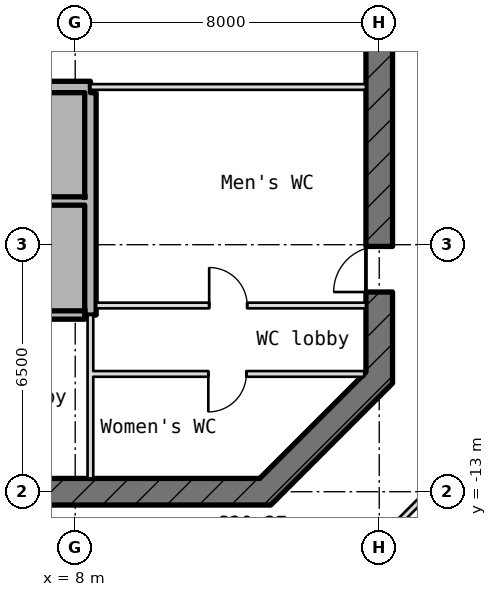
"""IFC4 building model, lengths in metres.
Left out: names, types, materials, properties, quantities, classifications, styles, units other than length and angle.
Written with IfcOpenShell. Run it as: python <this file> out.ifc"""

import sys

from ifc_helpers import new_model, si_unit, direction, frame, frame_2d, origin, place, context, subcontext, project, spatial, rectangle, extrude, element, fill, save


model = new_model("IFC4")
c1 = context("Model", 3, precision=1e-05, world=origin(), true_north=direction((0.0, 1.0)))
c2 = subcontext(c1, "Body", "Model", "MODEL_VIEW")
j1 = project(units=[si_unit("LENGTHUNIT", "METRE"), si_unit("PLANEANGLEUNIT", "RADIAN")], contexts=[c1])
p1 = place(None, origin())
s1 = spatial("IfcSite", under=j1, at=p1, CompositionType="ELEMENT")
p2 = place(p1, origin())
s2 = spatial("IfcBuilding", under=s1, at=p2, CompositionType="ELEMENT")
p3 = place(p2, frame((0.0, 0.0, 296.95)))
s3 = spatial("IfcBuildingStorey", under=s2, at=p3, CompositionType="ELEMENT", Elevation=296.95)
p4 = place(p3, frame((12.897, -13.103, -0.18), z_axis=(0.0, 0.0, 1.0), x_axis=(0.707106781187, 0.707106781187, 0.0)))
e1 = element("IfcWall", 1, at=p4, inside=s3, PredefinedType="SHEAR", context=c2, shape_type="SweptSolid", body=[
    extrude(rectangle(XDim=4.533, YDim=0.7, at=frame_2d((2.266, 0.0))), origin(), (0.0, 0.0, 1.0), 4.15),
])
p5 = place(p3, frame((16.0, -10.145, -0.18), z_axis=(0.0, 0.0, 1.0), x_axis=(0.0, 1.0, 0.0)))
e2 = element("IfcWall", 2, at=p5, inside=s3, PredefinedType="SHEAR", context=c2, shape_type="SweptSolid", body=[
    extrude(rectangle(XDim=20.29, YDim=0.7, at=frame_2d((10.145, 0.0))), origin(), (0.0, 0.0, 1.0), 4.15),
])
p6 = place(p5, frame((8.945, 0.0, 0.18)))
e3 = element("IfcOpeningElement", 3, at=p6, cuts=e2, PredefinedType="OPENING", context=c2, shape_type="SweptSolid", body=[
    extrude(rectangle(XDim=2.4, YDim=2.1, at=frame_2d((1.2, 1.05))), frame((0.0, 0.36, 0.0), z_axis=(0.0, -1.0, 0.0), x_axis=(1.0, 0.0, 0.0)), (0.0, 0.0, 1.0), 0.72),
])
p7 = place(p5, frame((13.545, 0.0, 0.18)))
e4 = element("IfcOpeningElement", 4, at=p7, cuts=e2, PredefinedType="OPENING", context=c2, shape_type="SweptSolid", body=[
    extrude(rectangle(XDim=1.2, YDim=2.1, at=frame_2d((0.6, 1.05))), frame((0.0, 0.36, 0.0), z_axis=(0.0, -1.0, 0.0), x_axis=(1.0, 0.0, 0.0)), (0.0, 0.0, 1.0), 0.72),
])
p8 = place(p5, frame((2.4, 0.0, 0.18)))
e5 = element("IfcOpeningElement", 5, at=p8, cuts=e2, PredefinedType="OPENING", context=c2, shape_type="SweptSolid", body=[
    extrude(rectangle(XDim=1.2, YDim=2.1, at=frame_2d((0.6, 1.05))), frame((0.0, 0.36, 0.0), z_axis=(0.0, -1.0, 0.0), x_axis=(1.0, 0.0, 0.0)), (0.0, 0.0, 1.0), 0.72),
])
p9 = place(p3, frame((-13.145, -13.0, -0.18), z_axis=(0.0, 0.0, 1.0), x_axis=(1.0, 0.0, 0.0)))
e6 = element("IfcWall", 6, at=p9, inside=s3, PredefinedType="SHEAR", context=c2, shape_type="SweptSolid", body=[
    extrude(rectangle(XDim=26.29, YDim=0.7, at=frame_2d((13.145, 0.0))), origin(), (0.0, 0.0, 1.0), 4.15),
])
p10 = place(p9, frame((2.845, 0.0, 0.18)))
e7 = element("IfcOpeningElement", 7, at=p10, cuts=e6, PredefinedType="OPENING", context=c2, shape_type="SweptSolid", body=[
    extrude(rectangle(XDim=1.2, YDim=2.1, at=frame_2d((0.6, 1.05))), frame((0.0, 0.36, 0.0), z_axis=(0.0, -1.0, 0.0), x_axis=(1.0, 0.0, 0.0)), (0.0, 0.0, 1.0), 0.72),
])
p11 = place(p9, frame((6.845, 0.0, 0.18)))
e8 = element("IfcOpeningElement", 8, at=p11, cuts=e6, PredefinedType="OPENING", context=c2, shape_type="SweptSolid", body=[
    extrude(rectangle(XDim=1.4, YDim=2.1, at=frame_2d((0.7, 1.05))), frame((0.0, 0.36, 0.0), z_axis=(0.0, -1.0, 0.0), x_axis=(1.0, 0.0, 0.0)), (0.0, 0.0, 1.0), 0.72),
])
p12 = place(p9, frame((15.445, 0.0, 0.18)))
e9 = element("IfcOpeningElement", 9, at=p12, cuts=e6, PredefinedType="OPENING", context=c2, shape_type="SweptSolid", body=[
    extrude(rectangle(XDim=1.4, YDim=2.1, at=frame_2d((0.7, 1.05))), frame((0.0, 0.36, 0.0), z_axis=(0.0, -1.0, 0.0), x_axis=(1.0, 0.0, 0.0)), (0.0, 0.0, 1.0), 0.72),
])
p13 = place(p3, frame((8.475, -9.9, 0.0), z_axis=(0.0, 0.0, 1.0), x_axis=(1.0, 0.0, 0.0)))
e10 = element("IfcWall", 10, at=p13, inside=s3, PredefinedType="PARTITIONING", context=c2, shape_type="SweptSolid", body=[
    extrude(rectangle(XDim=7.13, YDim=0.15, at=frame_2d((3.565, 0.0))), origin(), (0.0, 0.0, 1.0), 3.97),
])
p14 = place(p13, frame((3.028, 0.0, 0.0)))
e11 = element("IfcOpeningElement", 11, at=p14, cuts=e10, PredefinedType="OPENING", context=c2, shape_type="SweptSolid", body=[
    extrude(rectangle(XDim=1.0, YDim=2.1, at=frame_2d((0.5, 1.05))), frame((0.0, 0.085, 0.0), z_axis=(0.0, -1.0, 0.0), x_axis=(1.0, 0.0, 0.0)), (0.0, 0.0, 1.0), 0.17),
])
p15 = place(p3, frame((-2.69, -8.35, 0.0), z_axis=(0.0, 0.0, 1.0), x_axis=(1.0, 0.0, 0.0)))
e12 = element("IfcWall", 12, at=p15, inside=s3, PredefinedType="STANDARD", context=c2, shape_type="SweptSolid", body=[
    extrude(rectangle(XDim=10.94, YDim=0.22, at=frame_2d((5.47, 0.0))), origin(), (0.0, 0.0, 1.0), 3.97),
])
p16 = place(p15, frame((0.74, 0.0, 0.0)))
e13 = element("IfcOpeningElement", 13, at=p16, cuts=e12, PredefinedType="OPENING", context=c2, shape_type="SweptSolid", body=[
    extrude(rectangle(XDim=1.1, YDim=2.1, at=frame_2d((0.55, 1.05))), frame((0.0, 0.12, 0.0), z_axis=(0.0, -1.0, 0.0), x_axis=(1.0, 0.0, 0.0)), (0.0, 0.0, 1.0), 0.24),
])
p17 = place(p15, frame((3.54, 0.0, 0.0)))
e14 = element("IfcOpeningElement", 14, at=p17, cuts=e12, PredefinedType="OPENING", context=c2, shape_type="SweptSolid", body=[
    extrude(rectangle(XDim=1.1, YDim=2.1, at=frame_2d((0.55, 1.05))), frame((0.0, 0.12, 0.0), z_axis=(0.0, -1.0, 0.0), x_axis=(1.0, 0.0, 0.0)), (0.0, 0.0, 1.0), 0.24),
])
p18 = place(p3, frame((8.55, -8.1, 0.0), z_axis=(0.0, 0.0, 1.0), x_axis=(1.0, 0.0, 0.0)))
e15 = element("IfcWall", 15, at=p18, inside=s3, PredefinedType="PARTITIONING", context=c2, shape_type="SweptSolid", body=[
    extrude(rectangle(XDim=7.1, YDim=0.15, at=frame_2d((3.55, 0.0))), origin(), (0.0, 0.0, 1.0), 3.97),
])
p19 = place(p18, frame((2.975, 0.0, 0.0)))
e16 = element("IfcOpeningElement", 16, at=p19, cuts=e15, PredefinedType="OPENING", context=c2, shape_type="SweptSolid", body=[
    extrude(rectangle(XDim=1.0, YDim=2.1, at=frame_2d((0.5, 1.05))), frame((0.0, 0.085, 0.0), z_axis=(0.0, -1.0, 0.0), x_axis=(1.0, 0.0, 0.0)), (0.0, 0.0, 1.0), 0.17),
])
p20 = place(p3, frame((-8.25, -5.35, 0.0), z_axis=(0.0, 0.0, 1.0), x_axis=(1.0, 0.0, 0.0)))
e17 = element("IfcWall", 17, at=p20, inside=s3, PredefinedType="STANDARD", context=c2, shape_type="SweptSolid", body=[
    extrude(rectangle(XDim=16.5, YDim=0.22, at=frame_2d((8.25, 0.0))), origin(), (0.0, 0.0, 1.0), 3.97),
])
p21 = place(p3, frame((-8.4, -2.35, -0.18), z_axis=(0.0, 0.0, 1.0), x_axis=(1.0, 0.0, 0.0)))
e18 = element("IfcWall", 18, at=p21, inside=s3, PredefinedType="SHEAR", context=c2, shape_type="SweptSolid", body=[
    extrude(rectangle(XDim=16.8, YDim=0.3, at=frame_2d((8.4, 0.0))), origin(), (0.0, 0.0, 1.0), 4.15),
])
p22 = place(p21, frame((2.2, 0.0, 0.18)))
e19 = element("IfcOpeningElement", 19, at=p22, cuts=e18, PredefinedType="OPENING", context=c2, shape_type="SweptSolid", body=[
    extrude(rectangle(XDim=1.2, YDim=2.1, at=frame_2d((0.6, 1.05))), frame((0.0, 0.16, 0.0), z_axis=(0.0, -1.0, 0.0), x_axis=(1.0, 0.0, 0.0)), (0.0, 0.0, 1.0), 0.32),
])
p23 = place(p21, frame((5.0, 0.0, 0.18)))
e20 = element("IfcOpeningElement", 20, at=p23, cuts=e18, PredefinedType="OPENING", context=c2, shape_type="SweptSolid", body=[
    extrude(rectangle(XDim=1.2, YDim=2.1, at=frame_2d((0.6, 1.05))), frame((0.0, 0.16, 0.0), z_axis=(0.0, -1.0, 0.0), x_axis=(1.0, 0.0, 0.0)), (0.0, 0.0, 1.0), 0.32),
])
p24 = place(p21, frame((7.8, 0.0, 0.18)))
e21 = element("IfcOpeningElement", 21, at=p24, cuts=e18, PredefinedType="OPENING", context=c2, shape_type="SweptSolid", body=[
    extrude(rectangle(XDim=1.2, YDim=2.1, at=frame_2d((0.6, 1.05))), frame((0.0, 0.16, 0.0), z_axis=(0.0, -1.0, 0.0), x_axis=(1.0, 0.0, 0.0)), (0.0, 0.0, 1.0), 0.32),
])
p25 = place(p21, frame((10.6, 0.0, 0.18)))
e22 = element("IfcOpeningElement", 22, at=p25, cuts=e18, PredefinedType="OPENING", context=c2, shape_type="SweptSolid", body=[
    extrude(rectangle(XDim=1.2, YDim=2.1, at=frame_2d((0.6, 1.05))), frame((0.0, 0.16, 0.0), z_axis=(0.0, -1.0, 0.0), x_axis=(1.0, 0.0, 0.0)), (0.0, 0.0, 1.0), 0.32),
])
p26 = place(p21, frame((13.4, 0.0, 0.18)))
e23 = element("IfcOpeningElement", 23, at=p26, cuts=e18, PredefinedType="OPENING", context=c2, shape_type="SweptSolid", body=[
    extrude(rectangle(XDim=1.2, YDim=2.1, at=frame_2d((0.6, 1.05))), frame((0.0, 0.16, 0.0), z_axis=(0.0, -1.0, 0.0), x_axis=(1.0, 0.0, 0.0)), (0.0, 0.0, 1.0), 0.32),
])
p27 = place(p3, frame((8.4, -2.35, 0.0), z_axis=(0.0, 0.0, 1.0), x_axis=(1.0, 0.0, 0.0)))
e24 = element("IfcWall", 24, at=p27, inside=s3, PredefinedType="PARTITIONING", context=c2, shape_type="SweptSolid", body=[
    extrude(rectangle(XDim=7.25, YDim=0.15, at=frame_2d((3.625, 0.0))), origin(), (0.0, 0.0, 1.0), 3.97),
])
p28 = place(p3, frame((8.4, -12.65, 0.0), z_axis=(0.0, 0.0, 1.0), x_axis=(0.0, 1.0, 0.0)))
e25 = element("IfcWall", 25, at=p28, inside=s3, PredefinedType="PARTITIONING", context=c2, shape_type="SweptSolid", body=[
    extrude(rectangle(XDim=4.3, YDim=0.15, at=frame_2d((2.15, 0.0))), origin(), (0.0, 0.0, 1.0), 3.97),
])
p29 = place(p3, frame((8.4, -8.35, -0.18), z_axis=(0.0, 0.0, 1.0), x_axis=(0.0, 1.0, 0.0)))
e26 = element("IfcWall", 26, at=p29, inside=s3, PredefinedType="SHEAR", context=c2, shape_type="SweptSolid", body=[
    extrude(rectangle(XDim=5.85, YDim=0.3, at=frame_2d((2.925, 0.0))), origin(), (0.0, 0.0, 1.0), 4.15),
])
p30 = place(p3, frame((19.05, -11.263, 0.0), z_axis=(0.0, 0.0, 1.0), x_axis=(-0.707106781187, -0.707106781187, 0.0)))
e27 = element("IfcWall", 27, at=p30, inside=s3, PredefinedType="PARTITIONING", context=c2, shape_type="SweptSolid", body=[
    extrude(rectangle(XDim=6.769, YDim=0.15, at=frame_2d((3.385, 0.0))), origin(), (0.0, 0.0, 1.0), 3.97),
])
p31 = place(p19, origin())
e28 = element("IfcDoor", 28, at=p31, inside=s3, OperationType="SINGLE_SWING_RIGHT", PredefinedType="DOOR", context=c2, shape_type="SweptSolid", body=[
    extrude(rectangle(XDim=1.0, YDim=2.1, at=frame_2d((0.5, 1.05))), frame((0.0, 0.025, 0.0), z_axis=(0.0, -1.0, 0.0), x_axis=(1.0, 0.0, 0.0)), (0.0, 0.0, 1.0), 0.05),
])
fill(e16, e28)
p32 = place(p8, origin())
e29 = element("IfcDoor", 29, at=p32, inside=s3, OperationType="SINGLE_SWING_RIGHT", PredefinedType="DOOR", context=c2, shape_type="SweptSolid", body=[
    extrude(rectangle(XDim=1.2, YDim=2.1, at=frame_2d((0.6, 1.05))), frame((0.0, 0.025, 0.0), z_axis=(0.0, -1.0, 0.0), x_axis=(1.0, 0.0, 0.0)), (0.0, 0.0, 1.0), 0.05),
])
fill(e5, e29)
p33 = place(p14, frame((1.0, 0.0, 0.0), z_axis=(0.0, 0.0, 1.0), x_axis=(-1.0, 0.0, 0.0)))
e30 = element("IfcDoor", 30, at=p33, inside=s3, OperationType="SINGLE_SWING_LEFT", PredefinedType="DOOR", context=c2, shape_type="SweptSolid", body=[
    extrude(rectangle(XDim=1.0, YDim=2.1, at=frame_2d((0.5, 1.05))), frame((0.0, 0.025, 0.0), z_axis=(0.0, -1.0, 0.0), x_axis=(1.0, 0.0, 0.0)), (0.0, 0.0, 1.0), 0.05),
])
fill(e11, e30)
save(model, sys.argv[1])
